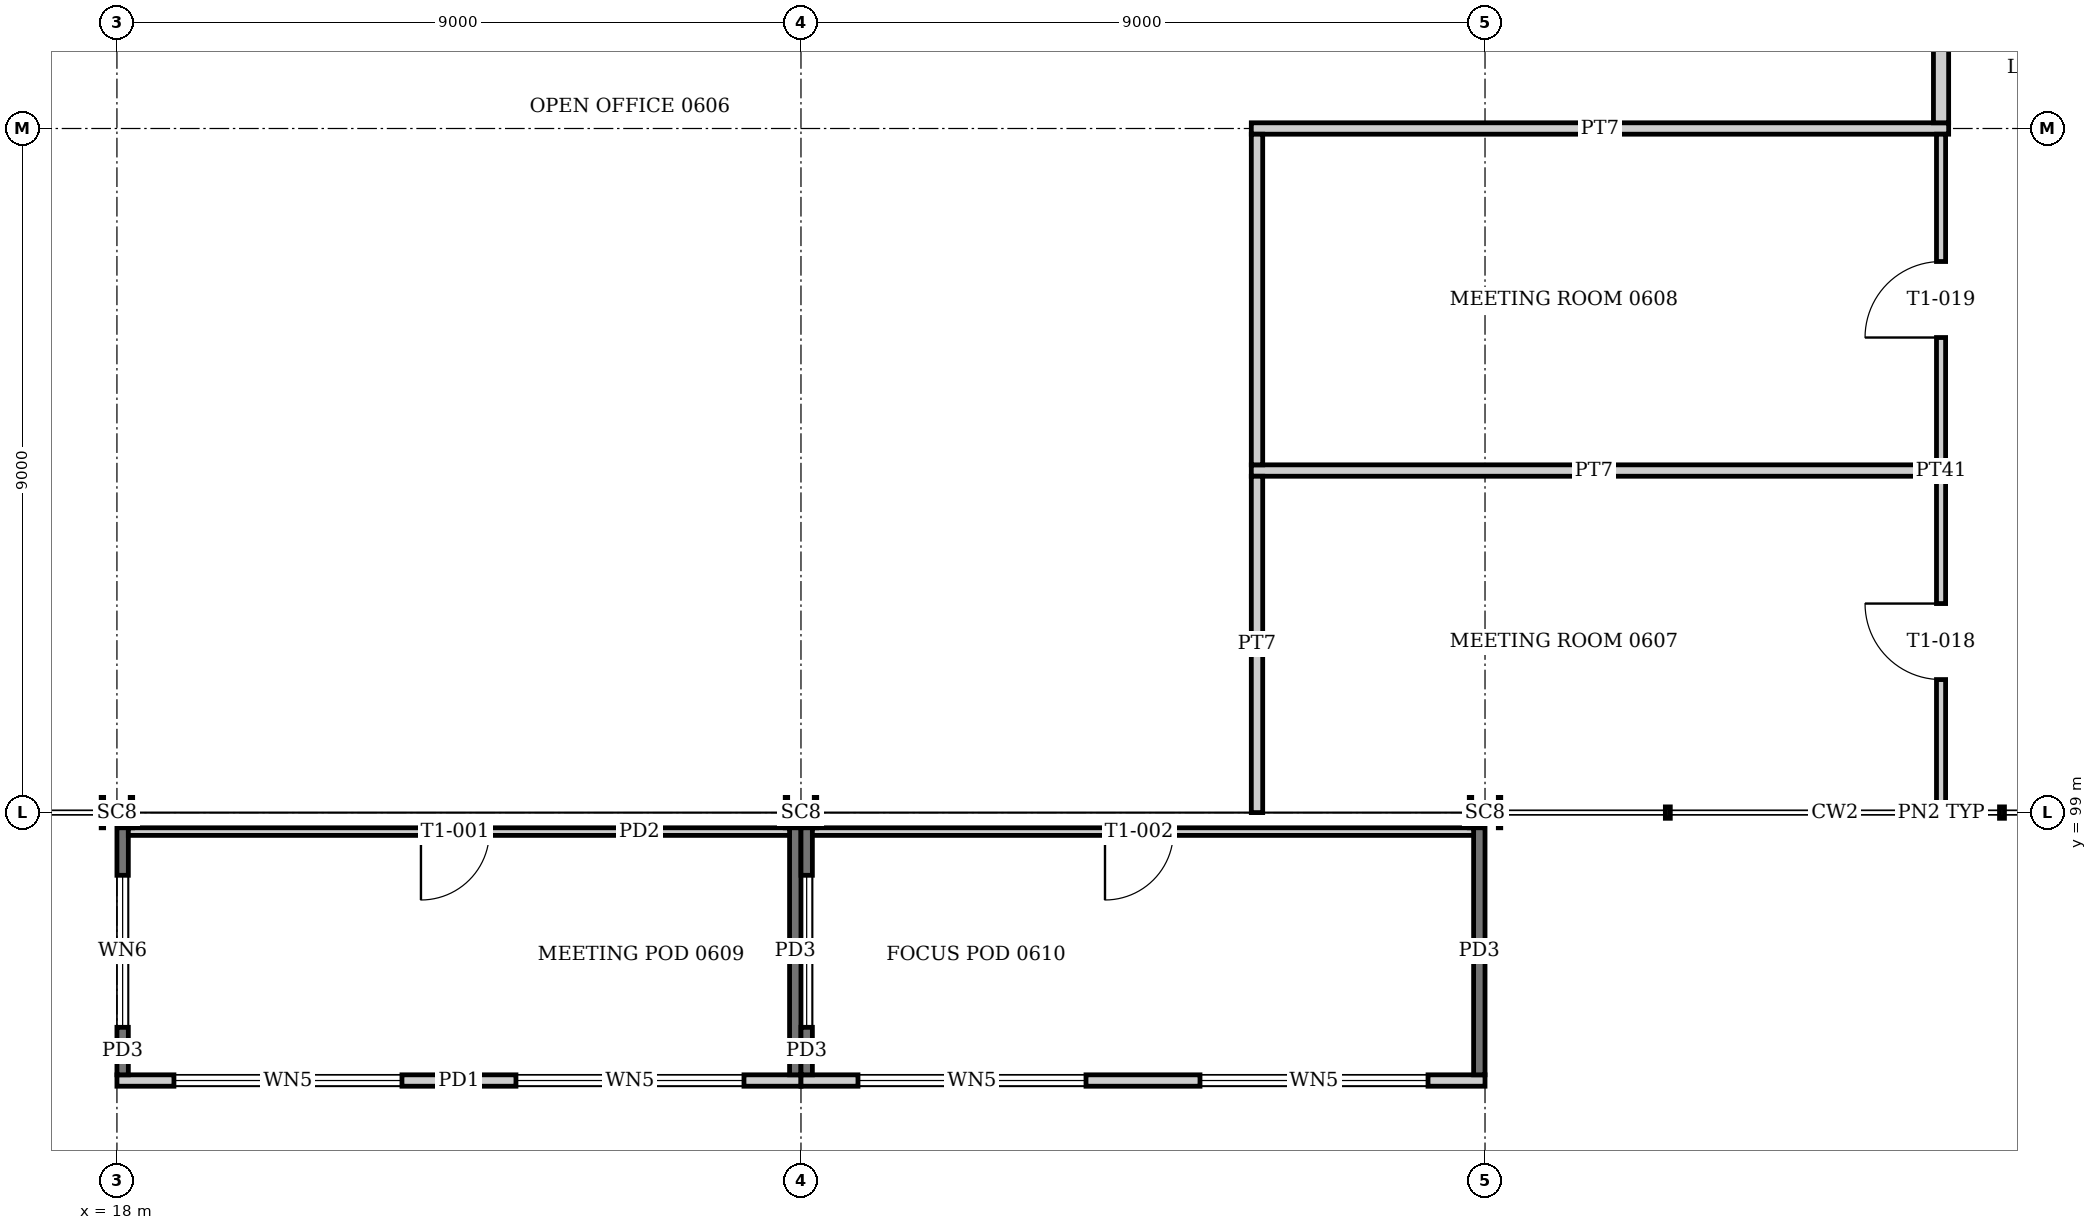
"""IFC4 building model, lengths in metres.
Left out: names, types, materials, properties, quantities, classifications, styles, units other than length and angle.
Written with IfcOpenShell. Run it as: python <this file> out.ifc"""

import sys

from ifc_helpers import new_model, si_unit, direction, frame, frame_2d, origin, origin_2d, place, context, subcontext, project, spatial, rectangle, i_section, extrude, element, fill, save


model = new_model("IFC4")
c1 = context("Model", 3, precision=1e-05, world=origin(), true_north=direction((0.0, 1.0)))
c2 = subcontext(c1, "Body", "Model", "MODEL_VIEW")
j1 = project(units=[si_unit("LENGTHUNIT", "METRE"), si_unit("PLANEANGLEUNIT", "RADIAN")], contexts=[c1])
p1 = place(None, origin())
s1 = spatial("IfcSite", under=j1, at=p1, CompositionType="ELEMENT")
p2 = place(p1, origin())
s2 = spatial("IfcBuilding", under=s1, at=p2, CompositionType="ELEMENT")
p3 = place(p2, frame((0.0, 0.0, 27.2)))
s3 = spatial("IfcBuildingStorey", under=s2, at=p3, CompositionType="ELEMENT", Elevation=27.2)
for number, where, z_axis, x_axis in (
    (1, (18.0, 99.0, 0.0), (0.0, 0.0, 1.0), (0.0, 1.0, 0.0)),
    (2, (27.0, 99.0, 0.0), (0.0, 0.0, 1.0), (0.0, 1.0, 0.0)),
    (3, (36.0, 99.0, 0.0), (0.0, 0.0, 1.0), (0.0, 1.0, 0.0)),
):
    element("IfcColumn", number, at=place(p3, frame(where, z_axis=z_axis, x_axis=x_axis)), inside=s3, PredefinedType="COLUMN", context=c2, shape_type="SweptSolid", body=[
        extrude(i_section(OverallWidth=0.4, OverallDepth=0.414, WebThickness=0.025, FlangeThickness=0.032, at=origin_2d()), origin(), (0.0, 0.0, 1.0), 4.0),
    ])
p4 = place(p3, frame((18.0, 95.475, 0.0), z_axis=(0.0, 0.0, 1.0), x_axis=(1.0, 0.0, 0.0)))
e4 = element("IfcWall", 4, at=p4, inside=s3, PredefinedType="SOLIDWALL", context=c2, shape_type="SweptSolid", body=[
    extrude(rectangle(XDim=9.0, YDim=0.15, at=frame_2d((4.5, 0.0))), origin(), (0.0, 0.0, 1.0), 2.6),
])
p5 = place(p4, frame((0.75, 0.0, 0.9)))
e5 = element("IfcOpeningElement", 5, at=p5, cuts=e4, PredefinedType="OPENING", context=c2, shape_type="SweptSolid", body=[
    extrude(rectangle(XDim=3.0, YDim=1.4, at=frame_2d((1.5, 0.7))), frame((0.0, 0.085, 0.0), z_axis=(0.0, -1.0, 0.0), x_axis=(1.0, 0.0, 0.0)), (0.0, 0.0, 1.0), 0.17),
])
p6 = place(p4, frame((5.25, 0.0, 0.9)))
e6 = element("IfcOpeningElement", 6, at=p6, cuts=e4, PredefinedType="OPENING", context=c2, shape_type="SweptSolid", body=[
    extrude(rectangle(XDim=3.0, YDim=1.4, at=frame_2d((1.5, 0.7))), frame((0.0, 0.085, 0.0), z_axis=(0.0, -1.0, 0.0), x_axis=(1.0, 0.0, 0.0)), (0.0, 0.0, 1.0), 0.17),
])
p7 = place(p3, frame((18.075, 95.55, -0.15), z_axis=(0.0, 0.0, 1.0), x_axis=(0.0, 1.0, 0.0)))
e7 = element("IfcWall", 7, at=p7, inside=s3, PredefinedType="SOLIDWALL", context=c2, shape_type="SweptSolid", body=[
    extrude(rectangle(XDim=3.25, YDim=0.15, at=frame_2d((1.625, 0.0))), origin(), (0.0, 0.0, 1.0), 2.75),
])
p8 = place(p7, frame((0.625, 0.0, 1.05)))
e8 = element("IfcOpeningElement", 8, at=p8, cuts=e7, PredefinedType="OPENING", context=c2, shape_type="SweptSolid", body=[
    extrude(rectangle(XDim=2.0, YDim=1.4, at=frame_2d((1.0, 0.7))), frame((0.0, 0.085, 0.0), z_axis=(0.0, -1.0, 0.0), x_axis=(1.0, 0.0, 0.0)), (0.0, 0.0, 1.0), 0.17),
])
p9 = place(p3, frame((26.925, 95.55, -0.15), z_axis=(0.0, 0.0, 1.0), x_axis=(0.0, 1.0, 0.0)))
e9 = element("IfcWall", 9, at=p9, inside=s3, PredefinedType="SOLIDWALL", context=c2, shape_type="SweptSolid", body=[
    extrude(rectangle(XDim=3.25, YDim=0.15, at=frame_2d((1.625, 0.0))), origin(), (0.0, 0.0, 1.0), 2.75),
])
p10 = place(p3, frame((18.15, 98.75, 0.0), z_axis=(0.0, 0.0, 1.0), x_axis=(1.0, 0.0, 0.0)))
e10 = element("IfcWall", 10, at=p10, inside=s3, PredefinedType="PARTITIONING", context=c2, shape_type="SweptSolid", body=[
    extrude(rectangle(XDim=8.7, YDim=0.1, at=frame_2d((4.35, 0.0))), origin(), (0.0, 0.0, 1.0), 2.6),
])
p11 = place(p10, frame((3.85, 0.0, 0.0)))
e11 = element("IfcOpeningElement", 11, at=p11, cuts=e10, PredefinedType="OPENING", context=c2, shape_type="SweptSolid", body=[
    extrude(rectangle(XDim=0.9, YDim=2.1, at=frame_2d((0.45, 1.05))), frame((0.0, 0.06, 0.0), z_axis=(0.0, -1.0, 0.0), x_axis=(1.0, 0.0, 0.0)), (0.0, 0.0, 1.0), 0.12),
])
p12 = place(p3, frame((27.0, 95.475, 0.0), z_axis=(0.0, 0.0, 1.0), x_axis=(1.0, 0.0, 0.0)))
e12 = element("IfcWall", 12, at=p12, inside=s3, PredefinedType="SOLIDWALL", context=c2, shape_type="SweptSolid", body=[
    extrude(rectangle(XDim=9.0, YDim=0.15, at=frame_2d((4.5, 0.0))), origin(), (0.0, 0.0, 1.0), 2.6),
])
p13 = place(p12, frame((0.75, 0.0, 0.9)))
e13 = element("IfcOpeningElement", 13, at=p13, cuts=e12, PredefinedType="OPENING", context=c2, shape_type="SweptSolid", body=[
    extrude(rectangle(XDim=3.0, YDim=1.4, at=frame_2d((1.5, 0.7))), frame((0.0, 0.085, 0.0), z_axis=(0.0, -1.0, 0.0), x_axis=(1.0, 0.0, 0.0)), (0.0, 0.0, 1.0), 0.17),
])
p14 = place(p12, frame((5.25, 0.0, 0.9)))
e14 = element("IfcOpeningElement", 14, at=p14, cuts=e12, PredefinedType="OPENING", context=c2, shape_type="SweptSolid", body=[
    extrude(rectangle(XDim=3.0, YDim=1.4, at=frame_2d((1.5, 0.7))), frame((0.0, 0.085, 0.0), z_axis=(0.0, -1.0, 0.0), x_axis=(1.0, 0.0, 0.0)), (0.0, 0.0, 1.0), 0.17),
])
p15 = place(p3, frame((27.075, 95.55, -0.15), z_axis=(0.0, 0.0, 1.0), x_axis=(0.0, 1.0, 0.0)))
e15 = element("IfcWall", 15, at=p15, inside=s3, PredefinedType="SOLIDWALL", context=c2, shape_type="SweptSolid", body=[
    extrude(rectangle(XDim=3.25, YDim=0.15, at=frame_2d((1.625, 0.0))), origin(), (0.0, 0.0, 1.0), 2.75),
])
p16 = place(p15, frame((0.625, 0.0, 1.05)))
e16 = element("IfcOpeningElement", 16, at=p16, cuts=e15, PredefinedType="OPENING", context=c2, shape_type="SweptSolid", body=[
    extrude(rectangle(XDim=2.0, YDim=1.4, at=frame_2d((1.0, 0.7))), frame((0.0, 0.085, 0.0), z_axis=(0.0, -1.0, 0.0), x_axis=(1.0, 0.0, 0.0)), (0.0, 0.0, 1.0), 0.17),
])
p17 = place(p3, frame((35.925, 95.55, -0.15), z_axis=(0.0, 0.0, 1.0), x_axis=(0.0, 1.0, 0.0)))
e17 = element("IfcWall", 17, at=p17, inside=s3, PredefinedType="SOLIDWALL", context=c2, shape_type="SweptSolid", body=[
    extrude(rectangle(XDim=3.25, YDim=0.15, at=frame_2d((1.625, 0.0))), origin(), (0.0, 0.0, 1.0), 2.75),
])
p18 = place(p3, frame((27.15, 98.75, 0.0), z_axis=(0.0, 0.0, 1.0), x_axis=(1.0, 0.0, 0.0)))
e18 = element("IfcWall", 18, at=p18, inside=s3, PredefinedType="PARTITIONING", context=c2, shape_type="SweptSolid", body=[
    extrude(rectangle(XDim=8.7, YDim=0.1, at=frame_2d((4.35, 0.0))), origin(), (0.0, 0.0, 1.0), 2.6),
])
p19 = place(p18, frame((3.85, 0.0, 0.0)))
e19 = element("IfcOpeningElement", 19, at=p19, cuts=e18, PredefinedType="OPENING", context=c2, shape_type="SweptSolid", body=[
    extrude(rectangle(XDim=0.9, YDim=2.1, at=frame_2d((0.45, 1.05))), frame((0.0, 0.06, 0.0), z_axis=(0.0, -1.0, 0.0), x_axis=(1.0, 0.0, 0.0)), (0.0, 0.0, 1.0), 0.12),
])
p20 = place(p3, frame((32.925, 103.5, 0.0), z_axis=(0.0, 0.0, 1.0), x_axis=(1.0, 0.0, 0.0)))
e20 = element("IfcWall", 20, at=p20, inside=s3, PredefinedType="PARTITIONING", context=c2, shape_type="SweptSolid", body=[
    extrude(rectangle(XDim=9.015, YDim=0.15, at=frame_2d((4.507, 0.0))), origin(), (0.0, 0.0, 1.0), 3.05),
])
p21 = place(p3, frame((32.925, 108.0, 0.0), z_axis=(0.0, 0.0, 1.0), x_axis=(1.0, 0.0, 0.0)))
e21 = element("IfcWall", 21, at=p21, inside=s3, PredefinedType="PARTITIONING", context=c2, shape_type="SweptSolid", body=[
    extrude(rectangle(XDim=9.175, YDim=0.15, at=frame_2d((4.587, 0.0))), origin(), (0.0, 0.0, 1.0), 3.05),
])
p22 = place(p3, frame((33.0, 99.0, 0.0), z_axis=(0.0, 0.0, 1.0), x_axis=(0.0, 1.0, 0.0)))
e22 = element("IfcWall", 22, at=p22, inside=s3, PredefinedType="PARTITIONING", context=c2, shape_type="SweptSolid", body=[
    extrude(rectangle(XDim=4.425, YDim=0.15, at=frame_2d((2.212, 0.0))), origin(), (0.0, 0.0, 1.0), 3.04),
])
p23 = place(p3, frame((33.0, 103.575, 0.0), z_axis=(0.0, 0.0, 1.0), x_axis=(0.0, 1.0, 0.0)))
e23 = element("IfcWall", 23, at=p23, inside=s3, PredefinedType="PARTITIONING", context=c2, shape_type="SweptSolid", body=[
    extrude(rectangle(XDim=4.35, YDim=0.15, at=frame_2d((2.175, 0.0))), origin(), (0.0, 0.0, 1.0), 3.85),
])
p24 = place(p3, frame((42.0, 99.075, 0.0), z_axis=(0.0, 0.0, 1.0), x_axis=(0.0, 1.0, 0.0)))
e24 = element("IfcWall", 24, at=p24, inside=s3, PredefinedType="PARTITIONING", context=c2, shape_type="SweptSolid", body=[
    extrude(rectangle(XDim=8.85, YDim=0.12, at=frame_2d((4.425, 0.0))), origin(), (0.0, 0.0, 1.0), 3.85),
])
p25 = place(p24, frame((1.675, 0.0, 0.0)))
e25 = element("IfcOpeningElement", 25, at=p25, cuts=e24, PredefinedType="OPENING", context=c2, shape_type="SweptSolid", body=[
    extrude(rectangle(XDim=1.0, YDim=2.1, at=frame_2d((0.5, 1.05))), frame((0.0, 0.07, 0.0), z_axis=(0.0, -1.0, 0.0), x_axis=(1.0, 0.0, 0.0)), (0.0, 0.0, 1.0), 0.14),
])
p26 = place(p24, frame((6.175, 0.0, 0.0)))
e26 = element("IfcOpeningElement", 26, at=p26, cuts=e24, PredefinedType="OPENING", context=c2, shape_type="SweptSolid", body=[
    extrude(rectangle(XDim=1.0, YDim=2.1, at=frame_2d((0.5, 1.05))), frame((0.0, 0.07, 0.0), z_axis=(0.0, -1.0, 0.0), x_axis=(1.0, 0.0, 0.0)), (0.0, 0.0, 1.0), 0.14),
])
p27 = place(p3, frame((42.0, 108.075, 0.0), z_axis=(0.0, 0.0, 1.0), x_axis=(0.0, 1.0, 0.0)))
e27 = element("IfcWall", 27, at=p27, inside=s3, PredefinedType="PARTITIONING", context=c2, shape_type="SweptSolid", body=[
    extrude(rectangle(XDim=8.835, YDim=0.2, at=frame_2d((4.417, 0.0))), origin(), (0.0, 0.0, 1.0), 3.85),
])
p28 = place(p27, frame((3.525, 0.0, 0.0)))
e28 = element("IfcOpeningElement", 28, at=p28, cuts=e27, PredefinedType="OPENING", context=c2, shape_type="SweptSolid", body=[
    extrude(rectangle(XDim=1.8, YDim=2.1, at=frame_2d((0.9, 1.05))), frame((0.0, 0.11, 0.0), z_axis=(0.0, -1.0, 0.0), x_axis=(1.0, 0.0, 0.0)), (0.0, 0.0, 1.0), 0.22),
])
p29 = place(p5, origin())
e29 = element("IfcWindow", 29, at=p29, inside=s3, PartitioningType="SINGLE_PANEL", PredefinedType="WINDOW", context=c2, shape_type="SweptSolid", body=[
    extrude(rectangle(XDim=3.0, YDim=1.4, at=frame_2d((1.5, 0.7))), frame((0.0, 0.03, 0.0), z_axis=(0.0, -1.0, 0.0), x_axis=(1.0, 0.0, 0.0)), (0.0, 0.0, 1.0), 0.06),
])
fill(e5, e29)
p30 = place(p6, origin())
e30 = element("IfcWindow", 30, at=p30, inside=s3, PartitioningType="SINGLE_PANEL", PredefinedType="WINDOW", context=c2, shape_type="SweptSolid", body=[
    extrude(rectangle(XDim=3.0, YDim=1.4, at=frame_2d((1.5, 0.7))), frame((0.0, 0.03, 0.0), z_axis=(0.0, -1.0, 0.0), x_axis=(1.0, 0.0, 0.0)), (0.0, 0.0, 1.0), 0.06),
])
fill(e6, e30)
p31 = place(p8, origin())
e31 = element("IfcWindow", 31, at=p31, inside=s3, PartitioningType="SINGLE_PANEL", PredefinedType="WINDOW", context=c2, shape_type="SweptSolid", body=[
    extrude(rectangle(XDim=2.0, YDim=1.4, at=frame_2d((1.0, 0.7))), frame((0.0, 0.03, 0.0), z_axis=(0.0, -1.0, 0.0), x_axis=(1.0, 0.0, 0.0)), (0.0, 0.0, 1.0), 0.06),
])
fill(e8, e31)
p32 = place(p11, frame((0.9, 0.0, 0.0), z_axis=(0.0, 0.0, 1.0), x_axis=(-1.0, 0.0, 0.0)))
e32 = element("IfcDoor", 32, at=p32, inside=s3, OperationType="SINGLE_SWING_RIGHT", PredefinedType="DOOR", context=c2, shape_type="SweptSolid", body=[
    extrude(rectangle(XDim=0.9, YDim=2.1, at=frame_2d((0.45, 1.05))), frame((0.0, 0.025, 0.0), z_axis=(0.0, -1.0, 0.0), x_axis=(1.0, 0.0, 0.0)), (0.0, 0.0, 1.0), 0.05),
])
fill(e11, e32)
p33 = place(p13, origin())
e33 = element("IfcWindow", 33, at=p33, inside=s3, PartitioningType="SINGLE_PANEL", PredefinedType="WINDOW", context=c2, shape_type="SweptSolid", body=[
    extrude(rectangle(XDim=3.0, YDim=1.4, at=frame_2d((1.5, 0.7))), frame((0.0, 0.03, 0.0), z_axis=(0.0, -1.0, 0.0), x_axis=(1.0, 0.0, 0.0)), (0.0, 0.0, 1.0), 0.06),
])
fill(e13, e33)
p34 = place(p14, origin())
e34 = element("IfcWindow", 34, at=p34, inside=s3, PartitioningType="SINGLE_PANEL", PredefinedType="WINDOW", context=c2, shape_type="SweptSolid", body=[
    extrude(rectangle(XDim=3.0, YDim=1.4, at=frame_2d((1.5, 0.7))), frame((0.0, 0.03, 0.0), z_axis=(0.0, -1.0, 0.0), x_axis=(1.0, 0.0, 0.0)), (0.0, 0.0, 1.0), 0.06),
])
fill(e14, e34)
p35 = place(p16, origin())
e35 = element("IfcWindow", 35, at=p35, inside=s3, PartitioningType="SINGLE_PANEL", PredefinedType="WINDOW", context=c2, shape_type="SweptSolid", body=[
    extrude(rectangle(XDim=2.0, YDim=1.4, at=frame_2d((1.0, 0.7))), frame((0.0, 0.03, 0.0), z_axis=(0.0, -1.0, 0.0), x_axis=(1.0, 0.0, 0.0)), (0.0, 0.0, 1.0), 0.06),
])
fill(e16, e35)
p36 = place(p19, frame((0.9, 0.0, 0.0), z_axis=(0.0, 0.0, 1.0), x_axis=(-1.0, 0.0, 0.0)))
e36 = element("IfcDoor", 36, at=p36, inside=s3, OperationType="SINGLE_SWING_RIGHT", PredefinedType="DOOR", context=c2, shape_type="SweptSolid", body=[
    extrude(rectangle(XDim=0.9, YDim=2.1, at=frame_2d((0.45, 1.05))), frame((0.0, 0.025, 0.0), z_axis=(0.0, -1.0, 0.0), x_axis=(1.0, 0.0, 0.0)), (0.0, 0.0, 1.0), 0.05),
])
fill(e19, e36)
p37 = place(p25, origin())
e37 = element("IfcDoor", 37, at=p37, inside=s3, OperationType="SINGLE_SWING_RIGHT", PredefinedType="DOOR", context=c2, shape_type="SweptSolid", body=[
    extrude(rectangle(XDim=1.0, YDim=2.1, at=frame_2d((0.5, 1.05))), frame((0.0, 0.025, 0.0), z_axis=(0.0, -1.0, 0.0), x_axis=(1.0, 0.0, 0.0)), (0.0, 0.0, 1.0), 0.05),
])
fill(e25, e37)
p38 = place(p26, origin())
e38 = element("IfcDoor", 38, at=p38, inside=s3, OperationType="SINGLE_SWING_LEFT", PredefinedType="DOOR", context=c2, shape_type="SweptSolid", body=[
    extrude(rectangle(XDim=1.0, YDim=2.1, at=frame_2d((0.5, 1.05))), frame((0.0, 0.025, 0.0), z_axis=(0.0, -1.0, 0.0), x_axis=(1.0, 0.0, 0.0)), (0.0, 0.0, 1.0), 0.05),
])
fill(e26, e38)
save(model, sys.argv[1])
